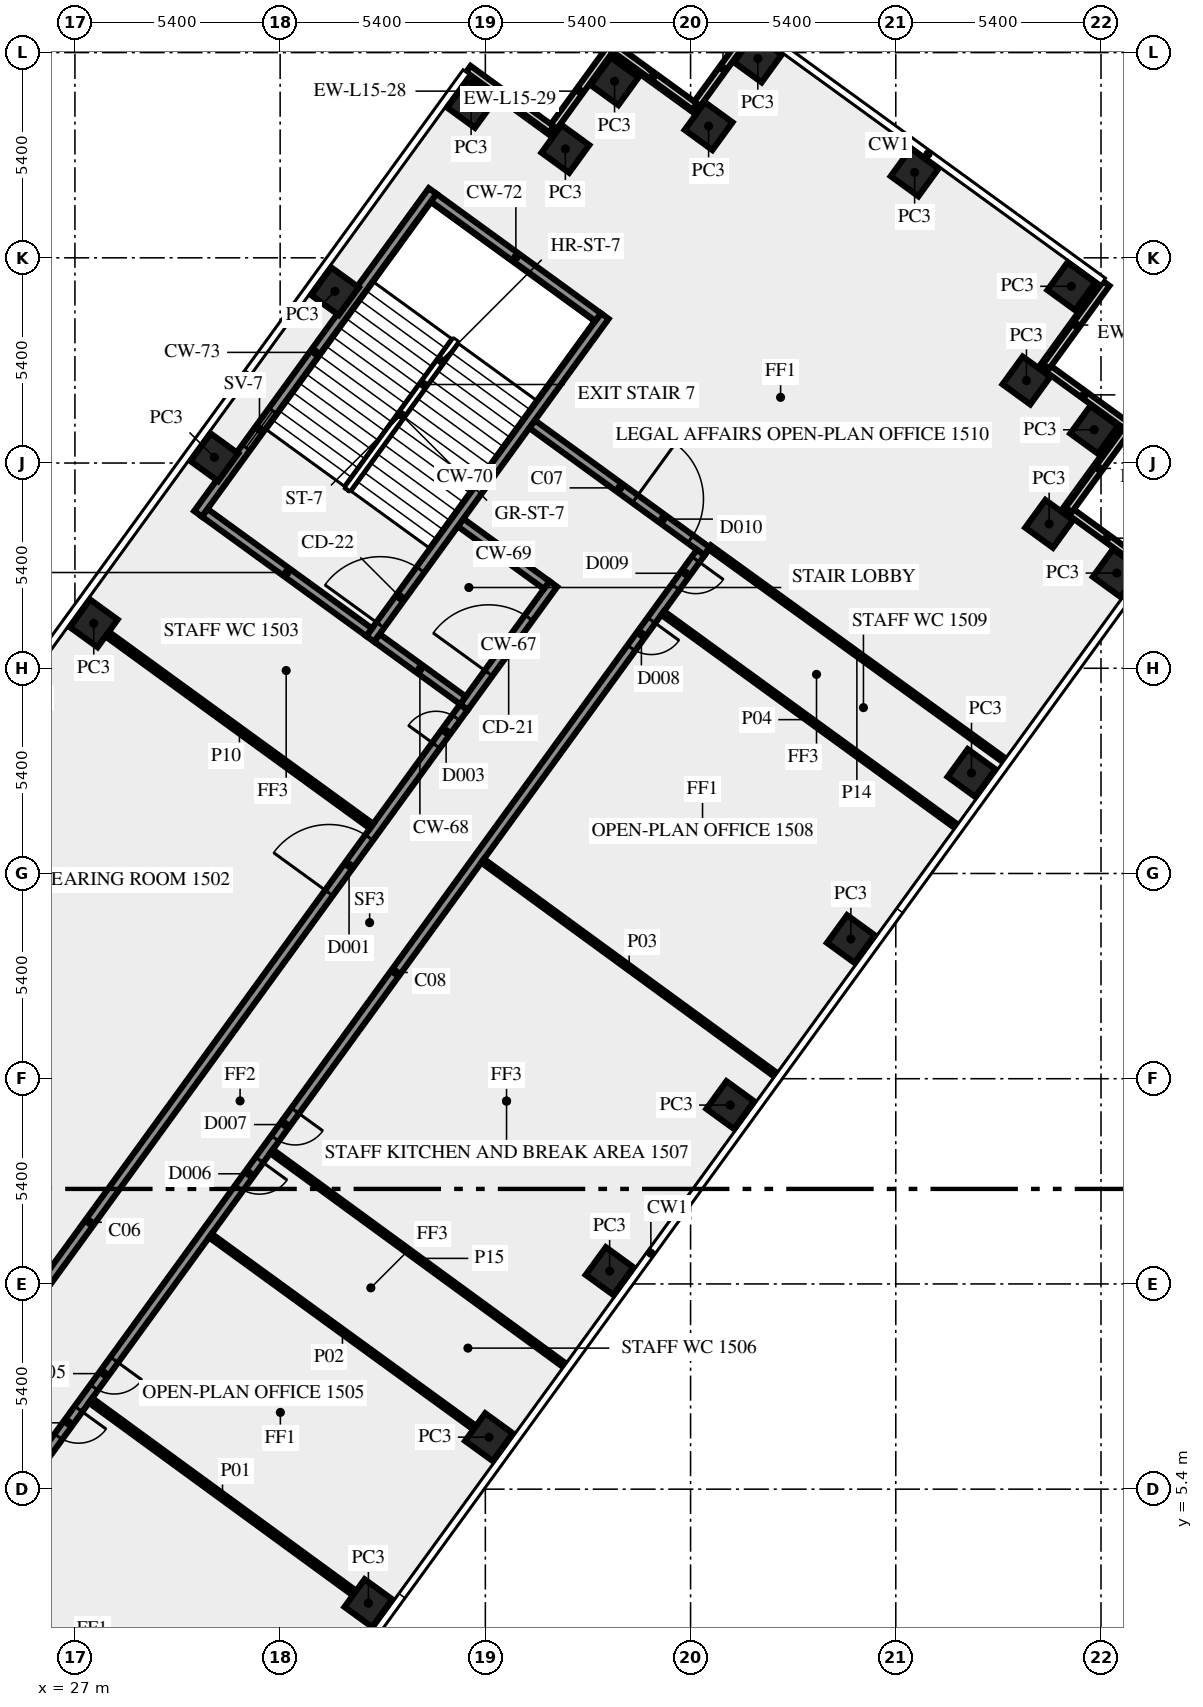
"""IFC4 building model, lengths in metres.
Left out: names, types, materials, properties, quantities, classifications, styles, units other than length and angle.
Written with IfcOpenShell. Run it as: python <this file> out.ifc"""

import sys

from ifc_helpers import new_model, si_unit, direction, frame, frame_2d, origin, origin_2d, place, context, subcontext, project, spatial, rectangle, extrude, element, fill, save


model = new_model("IFC4")
c1 = context("Model", 3, precision=1e-05, world=origin(), true_north=direction((0.0, 1.0)))
c2 = subcontext(c1, "Body", "Model", "MODEL_VIEW")
j1 = project(units=[si_unit("LENGTHUNIT", "METRE"), si_unit("PLANEANGLEUNIT", "RADIAN")], contexts=[c1])
p1 = place(None, origin())
s1 = spatial("IfcSite", under=j1, at=p1, CompositionType="ELEMENT")
p2 = place(p1, origin())
s2 = spatial("IfcBuilding", under=s1, at=p2, CompositionType="ELEMENT")
p3 = place(p2, frame((0.0, 0.0, 67.0)))
s3 = spatial("IfcBuildingStorey", under=s2, at=p3, CompositionType="ELEMENT", Elevation=67.0)
for number, where, z_axis, x_axis in (
    (1, (34.722, 2.4, 0.0), (0.0, 0.0, 1.0), (0.588, 0.809, 0.0)),
    (2, (37.896, 6.769, 0.0), (0.0, 0.0, 1.0), (0.588, 0.809, 0.0)),
    (3, (41.07, 11.137, 0.0), (0.0, 0.0, 1.0), (0.588, 0.809, 0.0)),
    (4, (44.244, 15.506, 0.0), (0.0, 0.0, 1.0), (0.588, 0.809, 0.0)),
    (5, (47.418, 19.875, 0.0), (0.0, 0.0, 1.0), (0.588, 0.809, 0.0)),
    (6, (50.592, 24.243, 0.0), (0.0, 0.0, 1.0), (0.588, 0.809, 0.0)),
    (7, (54.415, 29.505, 0.0), (0.0, 0.0, 1.0), (0.588, 0.809, 0.0)),
    (8, (52.636, 30.8, 0.0), (0.0, 0.0, 1.0), (-0.809, 0.588, 0.0)),
    (9, (53.82, 33.275, 0.0), (0.0, 0.0, 1.0), (-0.809, 0.588, 0.0)),
    (10, (52.039, 34.571, 0.0), (0.0, 0.0, 1.0), (0.588, 0.809, 0.0)),
    (11, (53.22, 37.05, 0.0), (0.0, 0.0, 1.0), (-0.809, 0.588, 0.0)),
    (12, (49.096, 40.047, 0.0), (0.0, 0.0, 1.0), (-0.809, 0.588, 0.0)),
    (13, (44.97, 43.045, 0.0), (0.0, 0.0, 1.0), (-0.809, 0.588, 0.0)),
    (14, (43.675, 41.265, 0.0), (0.0, 0.0, 1.0), (-0.809, 0.588, 0.0)),
    (15, (41.2, 42.445, 0.0), (0.0, 0.0, 1.0), (-0.588, -0.809, 0.0)),
    (16, (39.906, 40.666, 0.0), (0.0, 0.0, 1.0), (-0.588, -0.809, 0.0)),
    (17, (37.425, 41.85, 0.0), (0.0, 0.0, 1.0), (-0.588, -0.809, 0.0)),
    (18, (33.843, 36.919, 0.0), (0.0, 0.0, 1.0), (-0.588, -0.809, 0.0)),
    (19, (30.669, 32.55, 0.0), (0.0, 0.0, 1.0), (-0.588, -0.809, 0.0)),
    (20, (27.495, 28.181, 0.0), (0.0, 0.0, 1.0), (-0.588, -0.809, 0.0)),
):
    element("IfcColumn", number, at=place(p3, frame(where, z_axis=z_axis, x_axis=x_axis)), inside=s3, PredefinedType="COLUMN", context=c2, shape_type="SweptSolid", body=[
        extrude(rectangle(XDim=0.9, YDim=0.9, at=origin_2d()), origin(), (0.0, 0.0, 1.0), 3.65),
    ])
p4 = place(p3, frame((55.247, 29.629, 0.0), z_axis=(0.0, 0.0, 1.0), x_axis=(-0.809033161865, 0.587762999008, 0.0)))
e21 = element("IfcWall", 21, at=p4, inside=s3, PredefinedType="SOLIDWALL", context=c2, shape_type="SweptSolid", body=[
    extrude(rectangle(XDim=2.7, YDim=0.2, at=frame_2d((1.35, 0.0))), origin(), (0.0, 0.0, 1.0), 3.65),
])
p5 = place(p3, frame((53.151, 31.167, 0.0), z_axis=(0.0, 0.0, 1.0), x_axis=(0.587779184282, 0.809021403008, 0.0)))
e22 = element("IfcWall", 22, at=p5, inside=s3, PredefinedType="SOLIDWALL", context=c2, shape_type="SweptSolid", body=[
    extrude(rectangle(XDim=2.7, YDim=0.2, at=frame_2d((1.35, 0.0))), origin(), (0.0, 0.0, 1.0), 3.65),
])
for number, where, z_axis, x_axis in (
    (23, (54.65, 33.4, 0.0), (0.0, 0.0, 1.0), (-0.809, 0.588, 0.0)),
    (24, (52.553, 34.938, 0.0), (0.0, 0.0, 1.0), (0.588, 0.809, 0.0)),
    (25, (44.846, 43.875, 0.0), (0.0, 0.0, 1.0), (-0.588, -0.809, 0.0)),
    (26, (43.308, 41.779, 0.0), (0.0, 0.0, 1.0), (-0.809, 0.588, 0.0)),
):
    element("IfcWall", number, at=place(p3, frame(where, z_axis=z_axis, x_axis=x_axis)), inside=s3, PredefinedType="SOLIDWALL", context=c2, shape_type="SweptSolid", body=[
        extrude(rectangle(XDim=2.7, YDim=0.2, at=frame_2d((1.35, 0.0))), origin(), (0.0, 0.0, 1.0), 3.65),
    ])
p6 = place(p3, frame((41.075, 43.278, 0.0), z_axis=(0.0, 0.0, 1.0), x_axis=(-0.587806000234, -0.809001919707, 0.0)))
e27 = element("IfcWall", 27, at=p6, inside=s3, PredefinedType="SOLIDWALL", context=c2, shape_type="SweptSolid", body=[
    extrude(rectangle(XDim=2.7, YDim=0.2, at=frame_2d((1.35, 0.0))), origin(), (0.0, 0.0, 1.0), 3.65),
])
p7 = place(p3, frame((39.537, 41.181, 0.0), z_axis=(0.0, 0.0, 1.0), x_axis=(-0.809033161865, 0.587762999008, 0.0)))
e28 = element("IfcWall", 28, at=p7, inside=s3, PredefinedType="SOLIDWALL", context=c2, shape_type="SweptSolid", body=[
    extrude(rectangle(XDim=2.7, YDim=0.2, at=frame_2d((1.35, 0.0))), origin(), (0.0, 0.0, 1.0), 3.65),
])
p8 = place(p3, frame((37.238, 25.98, 0.0), z_axis=(0.0, 0.0, 1.0), x_axis=(0.587772420479, 0.809026317077, 0.0)))
e29 = element("IfcWall", 29, at=p8, inside=s3, PredefinedType="SHEAR", context=c2, shape_type="SweptSolid", body=[
    extrude(rectangle(XDim=4.0, YDim=0.25, at=frame_2d((2.0, 0.0))), origin(), (0.0, 0.0, 1.0), 3.65),
])
p9 = place(p8, frame((1.1, 0.0, 0.0)))
e30 = element("IfcOpeningElement", 30, at=p9, cuts=e29, PredefinedType="OPENING", context=c2, shape_type="SweptSolid", body=[
    extrude(rectangle(XDim=1.8, YDim=2.1, at=frame_2d((0.9, 1.05))), frame((0.0, 0.135, 0.0), z_axis=(0.0, -1.0, 0.0), x_axis=(1.0, 0.0, 0.0)), (0.0, 0.0, 1.0), 0.27),
])
for number, where, z_axis, x_axis in (
    (31, (37.21, 26.154, 0.0), (0.0, 0.0, 1.0), (-0.809, 0.588, 0.0)),
    (32, (39.414, 29.188, 0.0), (0.0, 0.0, 1.0), (-0.809, 0.588, 0.0)),
):
    element("IfcWall", number, at=place(p3, frame(where, z_axis=z_axis, x_axis=x_axis)), inside=s3, PredefinedType="SHEAR", context=c2, shape_type="SweptSolid", body=[
        extrude(rectangle(XDim=2.8, YDim=0.25, at=frame_2d((1.4, 0.0))), origin(), (0.0, 0.0, 1.0), 3.65),
    ])
p10 = place(p3, frame((34.77, 27.772, 0.0), z_axis=(0.0, 0.0, 1.0), x_axis=(0.587795589702, 0.809009483706, 0.0)))
e33 = element("IfcWall", 33, at=p10, inside=s3, PredefinedType="SHEAR", context=c2, shape_type="SweptSolid", body=[
    extrude(rectangle(XDim=10.5, YDim=0.25, at=frame_2d((5.25, 0.0))), origin(), (0.0, 0.0, 1.0), 3.65),
])
p11 = place(p10, frame((0.45, 0.0, 0.0)))
e34 = element("IfcOpeningElement", 34, at=p11, cuts=e33, PredefinedType="OPENING", context=c2, shape_type="SweptSolid", body=[
    extrude(rectangle(XDim=1.8, YDim=2.1, at=frame_2d((0.9, 1.05))), frame((0.0, 0.135, 0.0), z_axis=(0.0, -1.0, 0.0), x_axis=(1.0, 0.0, 0.0)), (0.0, 0.0, 1.0), 0.27),
])
p12 = place(p3, frame((34.742, 27.947, 0.0), z_axis=(0.0, 0.0, 1.0), x_axis=(-0.8089984606, 0.587810760999, 0.0)))
e35 = element("IfcWall", 35, at=p12, inside=s3, PredefinedType="SHEAR", context=c2, shape_type="SweptSolid", body=[
    extrude(rectangle(XDim=5.35, YDim=0.25, at=frame_2d((2.675, 0.0))), origin(), (0.0, 0.0, 1.0), 3.65),
])
p13 = place(p3, frame((40.767, 36.24, 0.0), z_axis=(0.0, 0.0, 1.0), x_axis=(-0.809020161303, 0.587780893365, 0.0)))
e36 = element("IfcWall", 36, at=p13, inside=s3, PredefinedType="SHEAR", context=c2, shape_type="SweptSolid", body=[
    extrude(rectangle(XDim=5.35, YDim=0.25, at=frame_2d((2.675, 0.0))), origin(), (0.0, 0.0, 1.0), 3.65),
])
p14 = place(p3, frame((30.24, 31.064, 0.0), z_axis=(0.0, 0.0, 1.0), x_axis=(0.587795589702, 0.809009483706, 0.0)))
e37 = element("IfcWall", 37, at=p14, inside=s3, PredefinedType="SHEAR", context=c2, shape_type="SweptSolid", body=[
    extrude(rectangle(XDim=10.5, YDim=0.25, at=frame_2d((5.25, 0.0))), origin(), (0.0, 0.0, 1.0), 3.65),
])
p15 = place(p14, frame((2.15, 0.0, 1.0)))
e38 = element("IfcOpeningElement", 38, at=p15, cuts=e37, PredefinedType="OPENING", context=c2, shape_type="SweptSolid", body=[
    extrude(rectangle(XDim=1.2, YDim=1.2, at=frame_2d((0.6, 0.6))), frame((0.0, 0.135, 0.0), z_axis=(0.0, -1.0, 0.0), x_axis=(1.0, 0.0, 0.0)), (0.0, 0.0, 1.0), 0.27),
])
p16 = place(p3, frame((17.545, -1.125, 0.0), z_axis=(0.0, 0.0, 1.0), x_axis=(0.587786323093, 0.809016216391, 0.0)))
e39 = element("IfcWall", 39, at=p16, inside=s3, PredefinedType="SOLIDWALL", context=c2, shape_type="SweptSolid", body=[
    extrude(rectangle(XDim=33.493, YDim=0.25, at=frame_2d((16.747, 0.0))), origin(), (0.0, 0.0, 1.0), 3.65),
])
p17 = place(p16, frame((27.458, 0.0, 0.0)))
e40 = element("IfcOpeningElement", 40, at=p17, cuts=e39, PredefinedType="OPENING", context=c2, shape_type="SweptSolid", body=[
    extrude(rectangle(XDim=1.8, YDim=2.1, at=frame_2d((0.9, 1.05))), frame((0.0, 0.135, 0.0), z_axis=(0.0, -1.0, 0.0), x_axis=(1.0, 0.0, 0.0)), (0.0, 0.0, 1.0), 0.27),
])
p18 = place(p16, frame((3.392, 0.0, 0.0)))
e41 = element("IfcOpeningElement", 41, at=p18, cuts=e39, PredefinedType="OPENING", context=c2, shape_type="SweptSolid", body=[
    extrude(rectangle(XDim=1.8, YDim=2.1, at=frame_2d((0.9, 1.05))), frame((0.0, 0.135, 0.0), z_axis=(0.0, -1.0, 0.0), x_axis=(1.0, 0.0, 0.0)), (0.0, 0.0, 1.0), 0.27),
])
p19 = place(p16, frame((32.253, 0.0, 0.0)))
e42 = element("IfcOpeningElement", 42, at=p19, cuts=e39, PredefinedType="OPENING", context=c2, shape_type="SweptSolid", body=[
    extrude(rectangle(XDim=0.9, YDim=2.1, at=frame_2d((0.45, 1.05))), frame((0.0, 0.135, 0.0), z_axis=(0.0, -1.0, 0.0), x_axis=(1.0, 0.0, 0.0)), (0.0, 0.0, 1.0), 0.27),
])
p20 = place(p3, frame((39.034, 33.42, 0.0), z_axis=(0.0, 0.0, 1.0), x_axis=(0.809023325802, -0.587776537732, 0.0)))
e43 = element("IfcWall", 43, at=p20, inside=s3, PredefinedType="SOLIDWALL", context=c2, shape_type="SweptSolid", body=[
    extrude(rectangle(XDim=5.695, YDim=0.25, at=frame_2d((2.848, 0.0))), origin(), (0.0, 0.0, 1.0), 3.65),
])
p21 = place(p20, frame((3.345, 0.0, 0.0)))
e44 = element("IfcOpeningElement", 44, at=p21, cuts=e43, PredefinedType="OPENING", context=c2, shape_type="SweptSolid", body=[
    extrude(rectangle(XDim=1.8, YDim=2.1, at=frame_2d((0.9, 1.05))), frame((0.0, 0.135, 0.0), z_axis=(0.0, -1.0, 0.0), x_axis=(1.0, 0.0, 0.0)), (0.0, 0.0, 1.0), 0.27),
])
p22 = place(p3, frame((43.467, 30.045, 0.0), z_axis=(0.0, 0.0, 1.0), x_axis=(-0.587784726077, -0.809017376692, 0.0)))
e45 = element("IfcWall", 45, at=p22, inside=s3, PredefinedType="SOLIDWALL", context=c2, shape_type="SweptSolid", body=[
    extrude(rectangle(XDim=39.02, YDim=0.25, at=frame_2d((19.51, 0.0))), origin(), (0.0, 0.0, 1.0), 3.65),
])
p23 = place(p22, frame((26.254, 0.0, 0.0)))
e46 = element("IfcOpeningElement", 46, at=p23, cuts=e45, PredefinedType="OPENING", context=c2, shape_type="SweptSolid", body=[
    extrude(rectangle(XDim=0.9, YDim=2.1, at=frame_2d((0.45, 1.05))), frame((0.0, 0.135, 0.0), z_axis=(0.0, -1.0, 0.0), x_axis=(1.0, 0.0, 0.0)), (0.0, 0.0, 1.0), 0.27),
])
p24 = place(p22, frame((2.205, 0.0, 0.0)))
e47 = element("IfcOpeningElement", 47, at=p24, cuts=e45, PredefinedType="OPENING", context=c2, shape_type="SweptSolid", body=[
    extrude(rectangle(XDim=0.9, YDim=2.1, at=frame_2d((0.45, 1.05))), frame((0.0, 0.135, 0.0), z_axis=(0.0, -1.0, 0.0), x_axis=(1.0, 0.0, 0.0)), (0.0, 0.0, 1.0), 0.27),
])
p25 = place(p22, frame((27.855, 0.0, 0.0)))
e48 = element("IfcOpeningElement", 48, at=p25, cuts=e45, PredefinedType="OPENING", context=c2, shape_type="SweptSolid", body=[
    extrude(rectangle(XDim=0.9, YDim=2.1, at=frame_2d((0.45, 1.05))), frame((0.0, 0.135, 0.0), z_axis=(0.0, -1.0, 0.0), x_axis=(1.0, 0.0, 0.0)), (0.0, 0.0, 1.0), 0.27),
])
p26 = place(p22, frame((18.155, 0.0, 0.0)))
e49 = element("IfcOpeningElement", 49, at=p26, cuts=e45, PredefinedType="OPENING", context=c2, shape_type="SweptSolid", body=[
    extrude(rectangle(XDim=0.9, YDim=2.1, at=frame_2d((0.45, 1.05))), frame((0.0, 0.135, 0.0), z_axis=(0.0, -1.0, 0.0), x_axis=(1.0, 0.0, 0.0)), (0.0, 0.0, 1.0), 0.27),
])
p27 = place(p22, frame((19.755, 0.0, 0.0)))
e50 = element("IfcOpeningElement", 50, at=p27, cuts=e45, PredefinedType="OPENING", context=c2, shape_type="SweptSolid", body=[
    extrude(rectangle(XDim=0.9, YDim=2.1, at=frame_2d((0.45, 1.05))), frame((0.0, 0.135, 0.0), z_axis=(0.0, -1.0, 0.0), x_axis=(1.0, 0.0, 0.0)), (0.0, 0.0, 1.0), 0.27),
])
p28 = place(p22, frame((0.224, 0.0, 0.0)))
e51 = element("IfcOpeningElement", 51, at=p28, cuts=e45, PredefinedType="OPENING", context=c2, shape_type="SweptSolid", body=[
    extrude(rectangle(XDim=0.9, YDim=2.1, at=frame_2d((0.45, 1.05))), frame((0.0, 0.135, 0.0), z_axis=(0.0, -1.0, 0.0), x_axis=(1.0, 0.0, 0.0)), (0.0, 0.0, 1.0), 0.27),
])
p29 = place(p3, frame((27.413, 7.735, 0.0), z_axis=(0.0, 0.0, 1.0), x_axis=(0.807664804385, -0.589641894507, 0.0)))
e52 = element("IfcWall", 52, at=p29, inside=s3, PredefinedType="PARTITIONING", context=c2, shape_type="SweptSolid", body=[
    extrude(rectangle(XDim=8.594, YDim=0.15, at=frame_2d((4.297, 0.0))), origin(), (0.0, 0.0, 1.0), 3.65),
])
p30 = place(p3, frame((37.516, 7.02, 0.0), z_axis=(0.0, 0.0, 1.0), x_axis=(-0.809002556908, 0.587805123248, 0.0)))
e53 = element("IfcWall", 53, at=p30, inside=s3, PredefinedType="PARTITIONING", context=c2, shape_type="SweptSolid", body=[
    extrude(rectangle(XDim=8.595, YDim=0.12, at=frame_2d((4.297, 0.0))), origin(), (0.0, 0.0, 1.0), 3.65),
])
p31 = place(p3, frame((37.728, 21.934, 0.0), z_axis=(0.0, 0.0, 1.0), x_axis=(0.807645841498, -0.589667868135, 0.0)))
e54 = element("IfcWall", 54, at=p31, inside=s3, PredefinedType="PARTITIONING", context=c2, shape_type="SweptSolid", body=[
    extrude(rectangle(XDim=9.551, YDim=0.12, at=frame_2d((4.775, 0.0))), origin(), (0.0, 0.0, 1.0), 2.75),
])
p32 = place(p3, frame((50.192, 22.841, 0.0), z_axis=(0.0, 0.0, 1.0), x_axis=(-0.809033337127, 0.587762757767, 0.0)))
e55 = element("IfcWall", 55, at=p32, inside=s3, PredefinedType="PARTITIONING", context=c2, shape_type="SweptSolid", body=[
    extrude(rectangle(XDim=9.551, YDim=0.12, at=frame_2d((4.775, 0.0))), origin(), (0.0, 0.0, 1.0), 2.75),
])
p33 = place(p3, frame((34.806, 22.845, 0.0), z_axis=(0.0, 0.0, 1.0), x_axis=(-0.809030728677, 0.587766348183, 0.0)))
e56 = element("IfcWall", 56, at=p33, inside=s3, PredefinedType="PARTITIONING", context=c2, shape_type="SweptSolid", body=[
    extrude(rectangle(XDim=8.596, YDim=0.15, at=frame_2d((4.298, 0.0))), origin(), (0.0, 0.0, 1.0), 3.65),
])
p34 = place(p3, frame((43.698, 30.185, 0.0), z_axis=(0.0, 0.0, 1.0), x_axis=(0.810419489461, -0.58585002441, 0.0)))
e57 = element("IfcWall", 57, at=p34, inside=s3, PredefinedType="PARTITIONING", context=c2, shape_type="SweptSolid", body=[
    extrude(rectangle(XDim=9.57, YDim=0.12, at=frame_2d((4.785, 0.0))), origin(), (0.0, 0.0, 1.0), 2.75),
])
p35 = place(p3, frame((32.174, 14.288, 0.0), z_axis=(0.0, 0.0, 1.0), x_axis=(0.807664588563, -0.589642190131, 0.0)))
e58 = element("IfcWall", 58, at=p35, inside=s3, PredefinedType="PARTITIONING", context=c2, shape_type="SweptSolid", body=[
    extrude(rectangle(XDim=9.55, YDim=0.12, at=frame_2d((4.775, 0.0))), origin(), (0.0, 0.0, 1.0), 2.75),
])
p36 = place(p9, origin())
e59 = element("IfcDoor", 59, at=p36, inside=s3, OperationType="DOUBLE_DOOR_SINGLE_SWING", PredefinedType="DOOR", context=c2, shape_type="SweptSolid", body=[
    extrude(rectangle(XDim=1.8, YDim=2.1, at=frame_2d((0.9, 1.05))), frame((0.0, 0.025, 0.0), z_axis=(0.0, -1.0, 0.0), x_axis=(1.0, 0.0, 0.0)), (0.0, 0.0, 1.0), 0.05),
])
fill(e30, e59)
p37 = place(p11, origin())
e60 = element("IfcDoor", 60, at=p37, inside=s3, OperationType="DOUBLE_DOOR_SINGLE_SWING", PredefinedType="DOOR", context=c2, shape_type="SweptSolid", body=[
    extrude(rectangle(XDim=1.8, YDim=2.1, at=frame_2d((0.9, 1.05))), frame((0.0, 0.025, 0.0), z_axis=(0.0, -1.0, 0.0), x_axis=(1.0, 0.0, 0.0)), (0.0, 0.0, 1.0), 0.05),
])
fill(e34, e60)
p38 = place(p15, origin())
e61 = element("IfcWindow", 61, at=p38, inside=s3, PartitioningType="SINGLE_PANEL", PredefinedType="WINDOW", context=c2, shape_type="SweptSolid", body=[
    extrude(rectangle(XDim=1.2, YDim=1.2, at=frame_2d((0.6, 0.6))), frame((0.0, 0.03, 0.0), z_axis=(0.0, -1.0, 0.0), x_axis=(1.0, 0.0, 0.0)), (0.0, 0.0, 1.0), 0.06),
])
fill(e38, e61)
p39 = place(p23, origin())
e62 = element("IfcDoor", 62, at=p39, inside=s3, OperationType="SINGLE_SWING_RIGHT", PredefinedType="DOOR", context=c2, shape_type="SweptSolid", body=[
    extrude(rectangle(XDim=0.9, YDim=2.1, at=frame_2d((0.45, 1.05))), frame((0.0, 0.025, 0.0), z_axis=(0.0, -1.0, 0.0), x_axis=(1.0, 0.0, 0.0)), (0.0, 0.0, 1.0), 0.05),
])
fill(e46, e62)
p40 = place(p24, origin())
e63 = element("IfcDoor", 63, at=p40, inside=s3, OperationType="SINGLE_SWING_LEFT", PredefinedType="DOOR", context=c2, shape_type="SweptSolid", body=[
    extrude(rectangle(XDim=0.9, YDim=2.1, at=frame_2d((0.45, 1.05))), frame((0.0, 0.025, 0.0), z_axis=(0.0, -1.0, 0.0), x_axis=(1.0, 0.0, 0.0)), (0.0, 0.0, 1.0), 0.05),
])
fill(e47, e63)
p41 = place(p17, origin())
e64 = element("IfcDoor", 64, at=p41, inside=s3, OperationType="DOUBLE_DOOR_SINGLE_SWING", PredefinedType="DOOR", context=c2, shape_type="SweptSolid", body=[
    extrude(rectangle(XDim=1.8, YDim=2.1, at=frame_2d((0.9, 1.05))), frame((0.0, 0.025, 0.0), z_axis=(0.0, -1.0, 0.0), x_axis=(1.0, 0.0, 0.0)), (0.0, 0.0, 1.0), 0.05),
])
fill(e40, e64)
p42 = place(p25, origin())
e65 = element("IfcDoor", 65, at=p42, inside=s3, OperationType="SINGLE_SWING_LEFT", PredefinedType="DOOR", context=c2, shape_type="SweptSolid", body=[
    extrude(rectangle(XDim=0.9, YDim=2.1, at=frame_2d((0.45, 1.05))), frame((0.0, 0.025, 0.0), z_axis=(0.0, -1.0, 0.0), x_axis=(1.0, 0.0, 0.0)), (0.0, 0.0, 1.0), 0.05),
])
fill(e48, e65)
p43 = place(p21, origin())
e66 = element("IfcDoor", 66, at=p43, inside=s3, OperationType="DOUBLE_DOOR_SINGLE_SWING", PredefinedType="DOOR", context=c2, shape_type="SweptSolid", body=[
    extrude(rectangle(XDim=1.8, YDim=2.1, at=frame_2d((0.9, 1.05))), frame((0.0, 0.025, 0.0), z_axis=(0.0, -1.0, 0.0), x_axis=(1.0, 0.0, 0.0)), (0.0, 0.0, 1.0), 0.05),
])
fill(e44, e66)
p44 = place(p26, origin())
e67 = element("IfcDoor", 67, at=p44, inside=s3, OperationType="SINGLE_SWING_RIGHT", PredefinedType="DOOR", context=c2, shape_type="SweptSolid", body=[
    extrude(rectangle(XDim=0.9, YDim=2.1, at=frame_2d((0.45, 1.05))), frame((0.0, 0.025, 0.0), z_axis=(0.0, -1.0, 0.0), x_axis=(1.0, 0.0, 0.0)), (0.0, 0.0, 1.0), 0.05),
])
fill(e49, e67)
p45 = place(p19, origin())
e68 = element("IfcDoor", 68, at=p45, inside=s3, OperationType="SINGLE_SWING_RIGHT", PredefinedType="DOOR", context=c2, shape_type="SweptSolid", body=[
    extrude(rectangle(XDim=0.9, YDim=2.1, at=frame_2d((0.45, 1.05))), frame((0.0, 0.025, 0.0), z_axis=(0.0, -1.0, 0.0), x_axis=(1.0, 0.0, 0.0)), (0.0, 0.0, 1.0), 0.05),
])
fill(e42, e68)
p46 = place(p27, origin())
e69 = element("IfcDoor", 69, at=p46, inside=s3, OperationType="SINGLE_SWING_LEFT", PredefinedType="DOOR", context=c2, shape_type="SweptSolid", body=[
    extrude(rectangle(XDim=0.9, YDim=2.1, at=frame_2d((0.45, 1.05))), frame((0.0, 0.025, 0.0), z_axis=(0.0, -1.0, 0.0), x_axis=(1.0, 0.0, 0.0)), (0.0, 0.0, 1.0), 0.05),
])
fill(e50, e69)
p47 = place(p28, origin())
e70 = element("IfcDoor", 70, at=p47, inside=s3, OperationType="SINGLE_SWING_LEFT", PredefinedType="DOOR", context=c2, shape_type="SweptSolid", body=[
    extrude(rectangle(XDim=0.9, YDim=2.1, at=frame_2d((0.45, 1.05))), frame((0.0, 0.025, 0.0), z_axis=(0.0, -1.0, 0.0), x_axis=(1.0, 0.0, 0.0)), (0.0, 0.0, 1.0), 0.05),
])
fill(e51, e70)
save(model, sys.argv[1])
